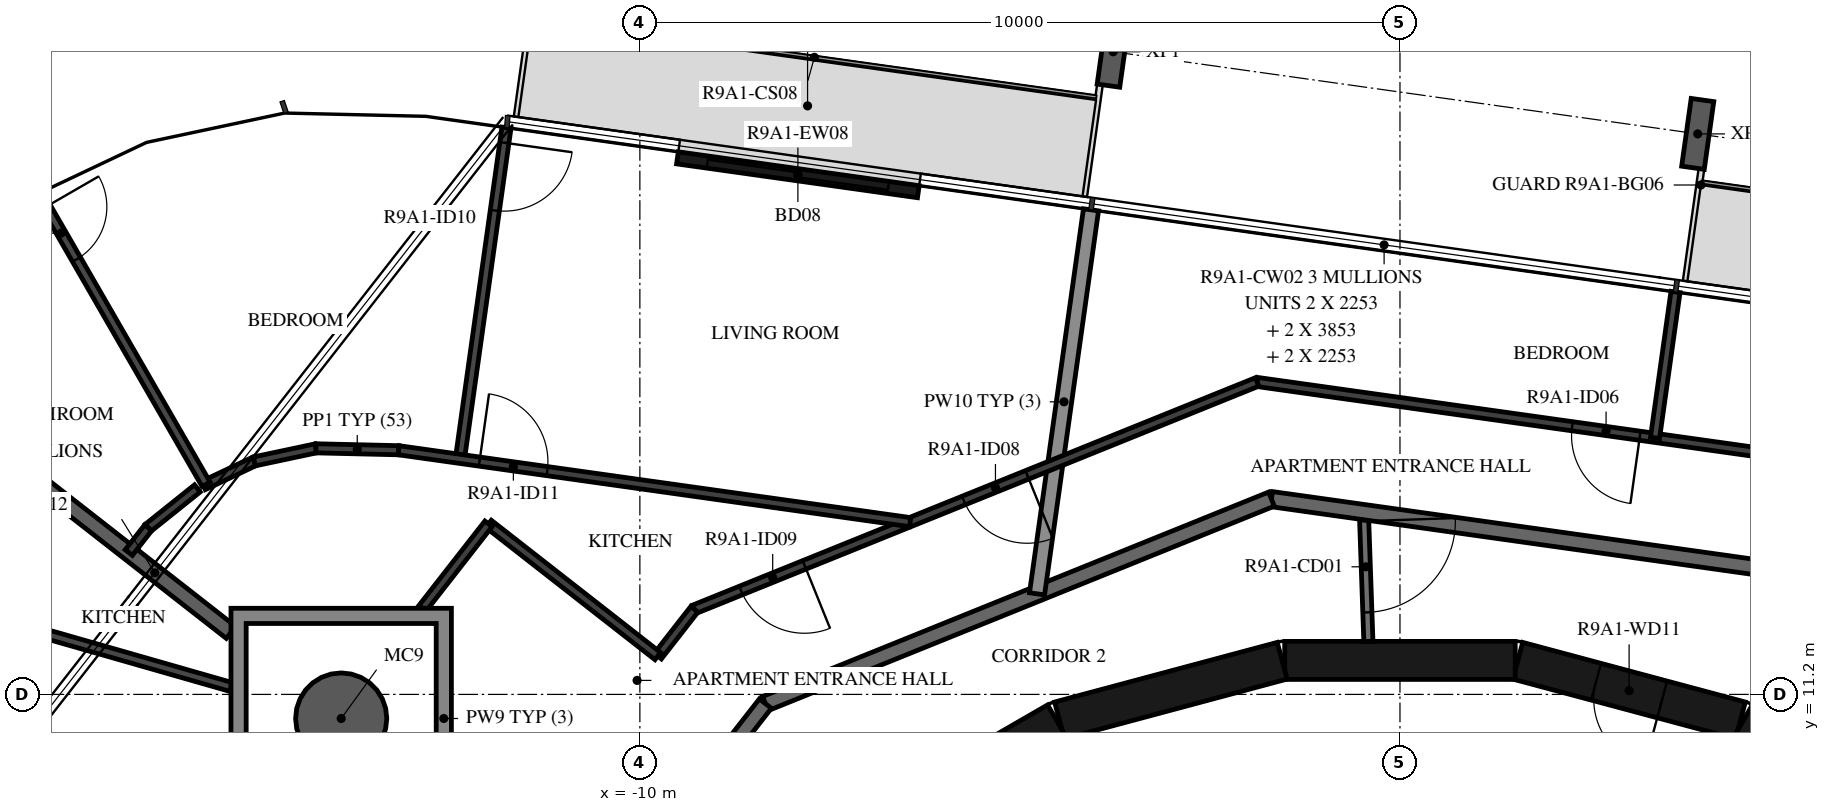
"""IFC4 building model, lengths in metres.
Left out: names, types, materials, properties, quantities, classifications, styles, units other than length and angle.
Written with IfcOpenShell. Run it as: python <this file> out.ifc"""

import sys

from ifc_helpers import new_model, si_unit, direction, frame, frame_2d, origin, origin_2d, place, context, subcontext, project, spatial, polyline, rectangle, hollow_circle, i_section, outline, extrude, element, fill, save


model = new_model("IFC4")
c1 = context("Model", 3, precision=1e-05, world=origin(), true_north=direction((0.0, 1.0)))
c2 = subcontext(c1, "Body", "Model", "MODEL_VIEW")
j1 = project(units=[si_unit("LENGTHUNIT", "METRE"), si_unit("PLANEANGLEUNIT", "RADIAN")], contexts=[c1])
p1 = place(None, origin())
s1 = spatial("IfcSite", under=j1, at=p1, CompositionType="ELEMENT")
p2 = place(p1, origin())
s2 = spatial("IfcBuilding", under=s1, at=p2, CompositionType="ELEMENT")
p3 = place(p2, frame((0.0, 0.0, 336.5)))
s3 = spatial("IfcBuildingStorey", under=s2, at=p3, CompositionType="ELEMENT", Elevation=336.5)
p4 = place(p3, frame((-13.929, 10.883, -0.38), z_axis=(0.0, 0.0, 1.0), x_axis=(1.0, 0.0, 0.0)))
e1 = element("IfcColumn", 1, at=p4, inside=s3, PredefinedType="COLUMN", context=c2, shape_type="SweptSolid", body=[
    extrude(hollow_circle(Radius=0.6, WallThickness=0.03, at=origin_2d()), origin(), (0.0, 0.0, 1.0), 3.5),
])
for number, where, z_axis, x_axis in (
    (2, (3.917, 18.574, -0.38), (0.0, 0.0, 1.0), (0.99, -0.139, 0.0)),
    (3, (-3.773, 19.655, -0.38), (0.0, 0.0, 1.0), (0.99, -0.139, 0.0)),
):
    element("IfcColumn", number, at=place(p3, frame(where, z_axis=z_axis, x_axis=x_axis)), inside=s3, PredefinedType="COLUMN", context=c2, shape_type="SweptSolid", body=[
        extrude(i_section(OverallWidth=0.3, OverallDepth=0.9, WebThickness=0.019, FlangeThickness=0.035, FilletRadius=0.03, at=origin_2d()), origin(), (0.0, 0.0, 1.0), 3.5),
    ])
p5 = place(p3, frame((-6.337, 17.814, 0.0), z_axis=(0.0, 0.0, 1.0), x_axis=(-0.99026890462, 0.13916715325, 0.0)))
e4 = element("IfcWall", 4, at=p5, inside=s3, PredefinedType="STANDARD", context=c2, shape_type="SweptSolid", body=[
    extrude(rectangle(XDim=3.2, YDim=0.16, at=frame_2d((1.6, 0.0))), origin(), (0.0, 0.0, 1.0), 3.12),
])
p6 = place(p5, frame((0.4, 0.0, 0.0)))
e5 = element("IfcOpeningElement", 5, at=p6, cuts=e4, PredefinedType="OPENING", context=c2, shape_type="SweptSolid", body=[
    extrude(rectangle(XDim=2.4, YDim=2.4, at=frame_2d((1.2, 1.2))), frame((0.0, 0.09, 0.0), z_axis=(0.0, -1.0, 0.0), x_axis=(1.0, 0.0, 0.0)), (0.0, 0.0, 1.0), 0.18),
])
p7 = place(p3, frame((7.137, 9.329, 0.0), z_axis=(0.0, 0.0, 1.0), x_axis=(-0.865975092491, 0.500087131594, 0.0)))
e6 = element("IfcWall", 6, at=p7, inside=s3, PredefinedType="SHEAR", context=c2, shape_type="SweptSolid", body=[
    extrude(rectangle(XDim=3.033, YDim=0.5, at=frame_2d((1.516, 0.0))), origin(), (0.0, 0.0, 1.0), 3.12),
])
p8 = place(p3, frame((4.479, 10.858, 0.0), z_axis=(0.0, 0.0, 1.0), x_axis=(-0.965948410781, 0.258734743916, 0.0)))
e7 = element("IfcWall", 7, at=p8, inside=s3, PredefinedType="SHEAR", context=c2, shape_type="SweptSolid", body=[
    extrude(rectangle(XDim=3.033, YDim=0.5, at=frame_2d((1.516, 0.0))), origin(), (0.0, 0.0, 1.0), 3.12),
])
p9 = place(p8, frame((1.066, 0.0, 0.0)))
e8 = element("IfcOpeningElement", 8, at=p9, cuts=e7, PredefinedType="OPENING", context=c2, shape_type="SweptSolid", body=[
    extrude(rectangle(XDim=0.9, YDim=2.1, at=frame_2d((0.45, 1.05))), frame((0.0, 0.26, 0.0), z_axis=(0.0, -1.0, 0.0), x_axis=(1.0, 0.0, 0.0)), (0.0, 0.0, 1.0), 0.52),
])
for number, where, z_axis, x_axis in (
    (9, (1.516, 11.647, 0.0), (0.0, 0.0, 1.0), (-1.0, 0.0, 0.0)),
    (10, (-1.55, 11.643, 0.0), (0.0, 0.0, 1.0), (-0.966, -0.259, 0.0)),
    (11, (-4.51, 10.845, 0.0), (0.0, 0.0, 1.0), (-0.866, -0.5, 0.0)),
):
    element("IfcWall", number, at=place(p3, frame(where, z_axis=z_axis, x_axis=x_axis)), inside=s3, PredefinedType="SHEAR", context=c2, shape_type="SweptSolid", body=[
        extrude(rectangle(XDim=3.033, YDim=0.5, at=frame_2d((1.516, 0.0))), origin(), (0.0, 0.0, 1.0), 3.12),
    ])
p10 = place(p3, frame((-0.475, 13.598, 0.0), z_axis=(0.0, 0.0, 1.0), x_axis=(0.034852521429, -0.999392466326, 0.0)))
e12 = element("IfcWall", 12, at=p10, inside=s3, PredefinedType="PARTITIONING", context=c2, shape_type="SweptSolid", body=[
    extrude(rectangle(XDim=1.702, YDim=0.12, at=frame_2d((0.851, 0.0))), origin(), (0.0, 0.0, 1.0), 3.12),
])
p11 = place(p10, frame((0.12, 0.0, 0.0)))
e13 = element("IfcOpeningElement", 13, at=p11, cuts=e12, PredefinedType="OPENING", context=c2, shape_type="SweptSolid", body=[
    extrude(rectangle(XDim=1.2, YDim=2.1, at=frame_2d((0.6, 1.05))), frame((0.0, 0.07, 0.0), z_axis=(0.0, -1.0, 0.0), x_axis=(1.0, 0.0, 0.0)), (0.0, 0.0, 1.0), 0.14),
])
p12 = place(p3, frame((5.42, 12.77, 0.0), z_axis=(0.0, 0.0, 1.0), x_axis=(-0.990270565508, 0.139155334385, 0.0)))
e14 = element("IfcWall", 14, at=p12, inside=s3, PredefinedType="STANDARD", context=c2, shape_type="SweptSolid", body=[
    extrude(rectangle(XDim=7.181, YDim=0.2, at=frame_2d((3.59, 0.0))), origin(), (0.0, 0.0, 1.0), 3.12),
])
p13 = place(p3, frame((-1.691, 13.769, 0.0), z_axis=(0.0, 0.0, 1.0), x_axis=(-0.92717916932, -0.374618189599, 0.0)))
e15 = element("IfcWall", 15, at=p13, inside=s3, PredefinedType="STANDARD", context=c2, shape_type="SweptSolid", body=[
    extrude(rectangle(XDim=7.181, YDim=0.2, at=frame_2d((3.591, 0.0))), origin(), (0.0, 0.0, 1.0), 3.12),
])
p14 = place(p3, frame((-8.349, 11.079, 0.0), z_axis=(0.0, 0.0, 1.0), x_axis=(-0.615669112324, -0.78800478687, 0.0)))
e16 = element("IfcWall", 16, at=p14, inside=s3, PredefinedType="STANDARD", context=c2, shape_type="SweptSolid", body=[
    extrude(rectangle(XDim=7.181, YDim=0.2, at=frame_2d((3.591, 0.0))), origin(), (0.0, 0.0, 1.0), 3.12),
])
p15 = place(p14, frame((2.1, 0.0, 0.0)))
e17 = element("IfcOpeningElement", 17, at=p15, cuts=e16, PredefinedType="OPENING", context=c2, shape_type="SweptSolid", body=[
    extrude(rectangle(XDim=1.0, YDim=2.1, at=frame_2d((0.5, 1.05))), frame((0.0, 0.11, 0.0), z_axis=(0.0, -1.0, 0.0), x_axis=(1.0, 0.0, 0.0)), (0.0, 0.0, 1.0), 0.22),
])
p16 = place(p14, frame((3.811, 0.0, 0.0)))
e18 = element("IfcOpeningElement", 18, at=p16, cuts=e16, PredefinedType="OPENING", context=c2, shape_type="SweptSolid", body=[
    extrude(rectangle(XDim=1.0, YDim=2.1, at=frame_2d((0.5, 1.05))), frame((0.0, 0.11, 0.0), z_axis=(0.0, -1.0, 0.0), x_axis=(1.0, 0.0, 0.0)), (0.0, 0.0, 1.0), 0.22),
])
p17 = place(p3, frame((-4.065, 17.575, 0.0), z_axis=(0.0, 0.0, 1.0), x_axis=(-0.139163175955, -0.990269463559, 0.0)))
e19 = element("IfcWall", 19, at=p17, inside=s3, PredefinedType="STANDARD", context=c2, shape_type="SweptSolid", body=[
    extrude(rectangle(XDim=5.102, YDim=0.2, at=frame_2d((2.551, 0.0))), origin(), (0.0, 0.0, 1.0), 2.73),
])
p18 = place(p3, frame((-20.191, 15.775, 0.0), z_axis=(0.0, 0.0, 1.0), x_axis=(0.788021948923, -0.615647145706, 0.0)))
e20 = element("IfcWall", 20, at=p18, inside=s3, PredefinedType="STANDARD", context=c2, shape_type="SweptSolid", body=[
    extrude(rectangle(XDim=6.106, YDim=0.2, at=frame_2d((3.053, 0.0))), origin(), (0.0, 0.0, 1.0), 3.12),
])
p19 = place(p3, frame((6.027, 14.199, 0.0), z_axis=(0.0, 0.0, 1.0), x_axis=(-0.990271593532, 0.139148018469, 0.0)))
e21 = element("IfcWall", 21, at=p19, inside=s3, PredefinedType="PARTITIONING", context=c2, shape_type="SweptSolid", body=[
    extrude(rectangle(XDim=7.985, YDim=0.12, at=frame_2d((3.992, 0.0))), origin(), (0.0, 0.0, 1.0), 3.12),
])
p20 = place(p19, frame((2.898, 0.0, 0.0)))
e22 = element("IfcOpeningElement", 22, at=p20, cuts=e21, PredefinedType="OPENING", context=c2, shape_type="SweptSolid", body=[
    extrude(rectangle(XDim=0.9, YDim=2.1, at=frame_2d((0.45, 1.05))), frame((0.0, 0.07, 0.0), z_axis=(0.0, -1.0, 0.0), x_axis=(1.0, 0.0, 0.0)), (0.0, 0.0, 1.0), 0.14),
])
p21 = place(p3, frame((-1.88, 15.311, 0.0), z_axis=(0.0, 0.0, 1.0), x_axis=(-0.927184866592, -0.374604088557, 0.0)))
e23 = element("IfcWall", 23, at=p21, inside=s3, PredefinedType="PARTITIONING", context=c2, shape_type="SweptSolid", body=[
    extrude(rectangle(XDim=7.985, YDim=0.12, at=frame_2d((3.993, 0.0))), origin(), (0.0, 0.0, 1.0), 3.12),
])
p22 = place(p21, frame((3.262, 0.0, 0.0)))
e24 = element("IfcOpeningElement", 24, at=p22, cuts=e23, PredefinedType="OPENING", context=c2, shape_type="SweptSolid", body=[
    extrude(rectangle(XDim=0.9, YDim=2.1, at=frame_2d((0.45, 1.05))), frame((0.0, 0.07, 0.0), z_axis=(0.0, -1.0, 0.0), x_axis=(1.0, 0.0, 0.0)), (0.0, 0.0, 1.0), 0.14),
])
p23 = place(p21, frame((6.423, 0.0, 0.0)))
e25 = element("IfcOpeningElement", 25, at=p23, cuts=e23, PredefinedType="OPENING", context=c2, shape_type="SweptSolid", body=[
    extrude(rectangle(XDim=0.9, YDim=2.1, at=frame_2d((0.45, 1.05))), frame((0.0, 0.07, 0.0), z_axis=(0.0, -1.0, 0.0), x_axis=(1.0, 0.0, 0.0)), (0.0, 0.0, 1.0), 0.14),
])
p24 = place(p3, frame((3.625, 16.494, 0.0), z_axis=(0.0, 0.0, 1.0), x_axis=(-0.139181494832, -0.990266889023, 0.0)))
e26 = element("IfcWall", 26, at=p24, inside=s3, PredefinedType="PARTITIONING", context=c2, shape_type="SweptSolid", body=[
    extrude(rectangle(XDim=1.938, YDim=0.12, at=frame_2d((0.969, 0.0))), origin(), (0.0, 0.0, 1.0), 2.73),
])
p25 = place(p3, frame((-9.283, 12.319, 0.0), z_axis=(0.0, 0.0, 1.0), x_axis=(-0.615735018346, -0.787953289975, 0.0)))
e27 = element("IfcWall", 27, at=p25, inside=s3, PredefinedType="PARTITIONING", context=c2, shape_type="SweptSolid", body=[
    extrude(rectangle(XDim=0.781, YDim=0.12, at=frame_2d((0.391, 0.0))), origin(), (0.0, 0.0, 1.0), 3.12),
])
p26 = place(p3, frame((-9.764, 11.704, 0.0), z_axis=(0.0, 0.0, 1.0), x_axis=(-0.787996873396, 0.615679240772, 0.0)))
e28 = element("IfcWall", 28, at=p26, inside=s3, PredefinedType="PARTITIONING", context=c2, shape_type="SweptSolid", body=[
    extrude(rectangle(XDim=2.826, YDim=0.12, at=frame_2d((1.413, 0.0))), origin(), (0.0, 0.0, 1.0), 3.12),
])
p27 = place(p3, frame((-11.992, 13.444, 0.0), z_axis=(0.0, 0.0, 1.0), x_axis=(-0.615593635541, -0.788063751153, 0.0)))
e29 = element("IfcWall", 29, at=p27, inside=s3, PredefinedType="PARTITIONING", context=c2, shape_type="SweptSolid", body=[
    extrude(rectangle(XDim=1.41, YDim=0.12, at=frame_2d((0.705, 0.0))), origin(), (0.0, 0.0, 1.0), 3.12),
])
p28 = place(p3, frame((-11.755, 18.656, 0.0), z_axis=(0.0, 0.0, 1.0), x_axis=(-0.13916046232, -0.990269844904, 0.0)))
e30 = element("IfcWall", 30, at=p28, inside=s3, PredefinedType="PARTITIONING", context=c2, shape_type="SweptSolid", body=[
    extrude(rectangle(XDim=4.4, YDim=0.12, at=frame_2d((2.2, 0.0))), origin(), (0.0, 0.0, 1.0), 2.73),
])
p29 = place(p28, frame((0.2, 0.0, 0.0)))
e31 = element("IfcOpeningElement", 31, at=p29, cuts=e30, PredefinedType="OPENING", context=c2, shape_type="SweptSolid", body=[
    extrude(rectangle(XDim=0.9, YDim=2.1, at=frame_2d((0.45, 1.05))), frame((0.0, 0.07, 0.0), z_axis=(0.0, -1.0, 0.0), x_axis=(1.0, 0.0, 0.0)), (0.0, 0.0, 1.0), 0.14),
])
p30 = place(p3, frame((-13.175, 14.412, 0.0), z_axis=(0.0, 0.0, 1.0), x_axis=(0.990264549393, -0.139198140128, 0.0)))
e32 = element("IfcWall", 32, at=p30, inside=s3, PredefinedType="PARTITIONING", context=c2, shape_type="SweptSolid", body=[
    extrude(rectangle(XDim=6.796, YDim=0.12, at=frame_2d((3.398, 0.0))), origin(), (0.0, 0.0, 1.0), 3.12),
])
p31 = place(p30, frame((1.075, 0.0, 0.0)))
e33 = element("IfcOpeningElement", 33, at=p31, cuts=e32, PredefinedType="OPENING", context=c2, shape_type="SweptSolid", body=[
    extrude(rectangle(XDim=0.9, YDim=2.1, at=frame_2d((0.45, 1.05))), frame((0.0, 0.07, 0.0), z_axis=(0.0, -1.0, 0.0), x_axis=(1.0, 0.0, 0.0)), (0.0, 0.0, 1.0), 0.14),
])
p32 = place(p3, frame((-15.743, 13.948, 0.0), z_axis=(0.0, 0.0, 1.0), x_axis=(0.903885078158, 0.427775368019, 0.0)))
e34 = element("IfcWall", 34, at=p32, inside=s3, PredefinedType="PARTITIONING", context=c2, shape_type="SweptSolid", body=[
    extrude(rectangle(XDim=0.742, YDim=0.12, at=frame_2d((0.371, 0.0))), origin(), (0.0, 0.0, 1.0), 3.12),
])
p33 = place(p3, frame((-15.072, 14.265, 0.0), z_axis=(0.0, 0.0, 1.0), x_axis=(0.978141630921, 0.207939774595, 0.0)))
e35 = element("IfcWall", 35, at=p33, inside=s3, PredefinedType="PARTITIONING", context=c2, shape_type="SweptSolid", body=[
    extrude(rectangle(XDim=0.829, YDim=0.12, at=frame_2d((0.415, 0.0))), origin(), (0.0, 0.0, 1.0), 3.12),
])
p34 = place(p3, frame((-14.261, 14.438, 0.0), z_axis=(0.0, 0.0, 1.0), x_axis=(0.999732237365, -0.023139869764, 0.0)))
e36 = element("IfcWall", 36, at=p34, inside=s3, PredefinedType="PARTITIONING", context=c2, shape_type="SweptSolid", body=[
    extrude(rectangle(XDim=1.087, YDim=0.12, at=frame_2d((0.543, 0.0))), origin(), (0.0, 0.0, 1.0), 3.12),
])
p35 = place(p3, frame((-17.912, 17.789, 0.0), z_axis=(0.0, 0.0, 1.0), x_axis=(0.499601164034, -0.866255549417, 0.0)))
e37 = element("IfcWall", 37, at=p35, inside=s3, PredefinedType="PARTITIONING", context=c2, shape_type="SweptSolid", body=[
    extrude(rectangle(XDim=4.415, YDim=0.12, at=frame_2d((2.207, 0.0))), origin(), (0.0, 0.0, 1.0), 2.73),
])
p36 = place(p35, frame((0.2, 0.0, 0.0)))
e38 = element("IfcOpeningElement", 38, at=p36, cuts=e37, PredefinedType="OPENING", context=c2, shape_type="SweptSolid", body=[
    extrude(rectangle(XDim=0.8, YDim=2.1, at=frame_2d((0.4, 1.05))), frame((0.0, 0.07, 0.0), z_axis=(0.0, -1.0, 0.0), x_axis=(1.0, 0.0, 0.0)), (0.0, 0.0, 1.0), 0.14),
])
p37 = place(p3, frame((-15.821, 13.91, 0.0), z_axis=(0.0, 0.0, 1.0), x_axis=(-0.780840072472, -0.624730967074, 0.0)))
e39 = element("IfcWall", 39, at=p37, inside=s3, PredefinedType="PARTITIONING", context=c2, shape_type="SweptSolid", body=[
    extrude(rectangle(XDim=0.829, YDim=0.12, at=frame_2d((0.415, 0.0))), origin(), (0.0, 0.0, 1.0), 3.12),
])
p38 = place(p3, frame((-16.469, 13.393, 0.0), z_axis=(0.0, 0.0, 1.0), x_axis=(-0.615815563257, -0.787890342656, 0.0)))
e40 = element("IfcWall", 40, at=p38, inside=s3, PredefinedType="PARTITIONING", context=c2, shape_type="SweptSolid", body=[
    extrude(rectangle(XDim=0.414, YDim=0.12, at=frame_2d((0.207, 0.0))), origin(), (0.0, 0.0, 1.0), 3.12),
])
p39 = place(p3, frame((-21.594, 13.077, 0.0), z_axis=(0.0, 0.0, 1.0), x_axis=(0.961389857774, -0.275190009576, 0.0)))
e41 = element("IfcWall", 41, at=p39, inside=s3, PredefinedType="PARTITIONING", context=c2, shape_type="SweptSolid", body=[
    extrude(rectangle(XDim=6.464, YDim=0.12, at=frame_2d((3.232, 0.0))), origin(), (0.0, 0.0, 1.0), 2.73),
])
p40 = place(p39, frame((0.2, 0.0, 0.0)))
e42 = element("IfcOpeningElement", 42, at=p40, cuts=e41, PredefinedType="OPENING", context=c2, shape_type="SweptSolid", body=[
    extrude(rectangle(XDim=0.9, YDim=2.1, at=frame_2d((0.45, 1.05))), frame((0.0, 0.07, 0.0), z_axis=(0.0, -1.0, 0.0), x_axis=(1.0, 0.0, 0.0)), (0.0, 0.0, 1.0), 0.14),
])
p41 = place(p3, origin())
e43 = element("IfcWall", 43, at=p41, inside=s3, PredefinedType="STANDARD", context=c2, shape_type="SweptSolid", body=[
    extrude(outline(polyline([(-12.479, 12.333), (-12.479, 9.433), (-15.379, 9.433), (-15.379, 12.333), (-12.479, 12.333)]), holes=[polyline([(-15.179, 9.633), (-12.679, 9.633), (-12.679, 12.133), (-15.179, 12.133), (-15.179, 9.633)])]), origin(), (0.0, 0.0, 1.0), 3.12),
])
p42 = place(p6, origin())
e44 = element("IfcDoor", 44, at=p42, inside=s3, OperationType="DOUBLE_DOOR_SLIDING", PredefinedType="DOOR", context=c2, shape_type="SweptSolid", body=[
    extrude(rectangle(XDim=2.4, YDim=2.4, at=frame_2d((1.2, 1.2))), frame((0.0, 0.025, 0.0), z_axis=(0.0, -1.0, 0.0), x_axis=(1.0, 0.0, 0.0)), (0.0, 0.0, 1.0), 0.05),
])
fill(e5, e44)
p43 = place(p9, origin())
e45 = element("IfcDoor", 45, at=p43, inside=s3, OperationType="SINGLE_SWING_LEFT", PredefinedType="DOOR", context=c2, shape_type="SweptSolid", body=[
    extrude(rectangle(XDim=0.9, YDim=2.1, at=frame_2d((0.45, 1.05))), frame((0.0, 0.025, 0.0), z_axis=(0.0, -1.0, 0.0), x_axis=(1.0, 0.0, 0.0)), (0.0, 0.0, 1.0), 0.05),
])
fill(e8, e45)
p44 = place(p20, origin())
e46 = element("IfcDoor", 46, at=p44, inside=s3, OperationType="SINGLE_SWING_LEFT", PredefinedType="DOOR", context=c2, shape_type="SweptSolid", body=[
    extrude(rectangle(XDim=0.9, YDim=2.1, at=frame_2d((0.45, 1.05))), frame((0.0, 0.025, 0.0), z_axis=(0.0, -1.0, 0.0), x_axis=(1.0, 0.0, 0.0)), (0.0, 0.0, 1.0), 0.05),
])
fill(e22, e46)
p45 = place(p22, origin())
e47 = element("IfcDoor", 47, at=p45, inside=s3, OperationType="SINGLE_SWING_RIGHT", PredefinedType="DOOR", context=c2, shape_type="SweptSolid", body=[
    extrude(rectangle(XDim=0.9, YDim=2.1, at=frame_2d((0.45, 1.05))), frame((0.0, 0.025, 0.0), z_axis=(0.0, -1.0, 0.0), x_axis=(1.0, 0.0, 0.0)), (0.0, 0.0, 1.0), 0.05),
])
fill(e24, e47)
p46 = place(p23, origin())
e48 = element("IfcDoor", 48, at=p46, inside=s3, OperationType="SINGLE_SWING_RIGHT", PredefinedType="DOOR", context=c2, shape_type="SweptSolid", body=[
    extrude(rectangle(XDim=0.9, YDim=2.1, at=frame_2d((0.45, 1.05))), frame((0.0, 0.025, 0.0), z_axis=(0.0, -1.0, 0.0), x_axis=(1.0, 0.0, 0.0)), (0.0, 0.0, 1.0), 0.05),
])
fill(e25, e48)
p47 = place(p29, origin())
e49 = element("IfcDoor", 49, at=p47, inside=s3, OperationType="SINGLE_SWING_RIGHT", PredefinedType="DOOR", context=c2, shape_type="SweptSolid", body=[
    extrude(rectangle(XDim=0.9, YDim=2.1, at=frame_2d((0.45, 1.05))), frame((0.0, 0.025, 0.0), z_axis=(0.0, -1.0, 0.0), x_axis=(1.0, 0.0, 0.0)), (0.0, 0.0, 1.0), 0.05),
])
fill(e31, e49)
p48 = place(p36, origin())
e50 = element("IfcDoor", 50, at=p48, inside=s3, OperationType="SINGLE_SWING_RIGHT", PredefinedType="DOOR", context=c2, shape_type="SweptSolid", body=[
    extrude(rectangle(XDim=0.8, YDim=2.1, at=frame_2d((0.4, 1.05))), frame((0.0, 0.025, 0.0), z_axis=(0.0, -1.0, 0.0), x_axis=(1.0, 0.0, 0.0)), (0.0, 0.0, 1.0), 0.05),
])
fill(e38, e50)
p49 = place(p31, origin())
e51 = element("IfcDoor", 51, at=p49, inside=s3, OperationType="SINGLE_SWING_LEFT", PredefinedType="DOOR", context=c2, shape_type="SweptSolid", body=[
    extrude(rectangle(XDim=0.9, YDim=2.1, at=frame_2d((0.45, 1.05))), frame((0.0, 0.025, 0.0), z_axis=(0.0, -1.0, 0.0), x_axis=(1.0, 0.0, 0.0)), (0.0, 0.0, 1.0), 0.05),
])
fill(e33, e51)
p50 = place(p11, origin())
e52 = element("IfcDoor", 52, at=p50, inside=s3, OperationType="DOUBLE_DOOR_SINGLE_SWING", PredefinedType="DOOR", context=c2, shape_type="SweptSolid", body=[
    extrude(rectangle(XDim=1.2, YDim=2.1, at=frame_2d((0.6, 1.05))), frame((0.0, 0.025, 0.0), z_axis=(0.0, -1.0, 0.0), x_axis=(1.0, 0.0, 0.0)), (0.0, 0.0, 1.0), 0.05),
])
fill(e13, e52)
save(model, sys.argv[1])
